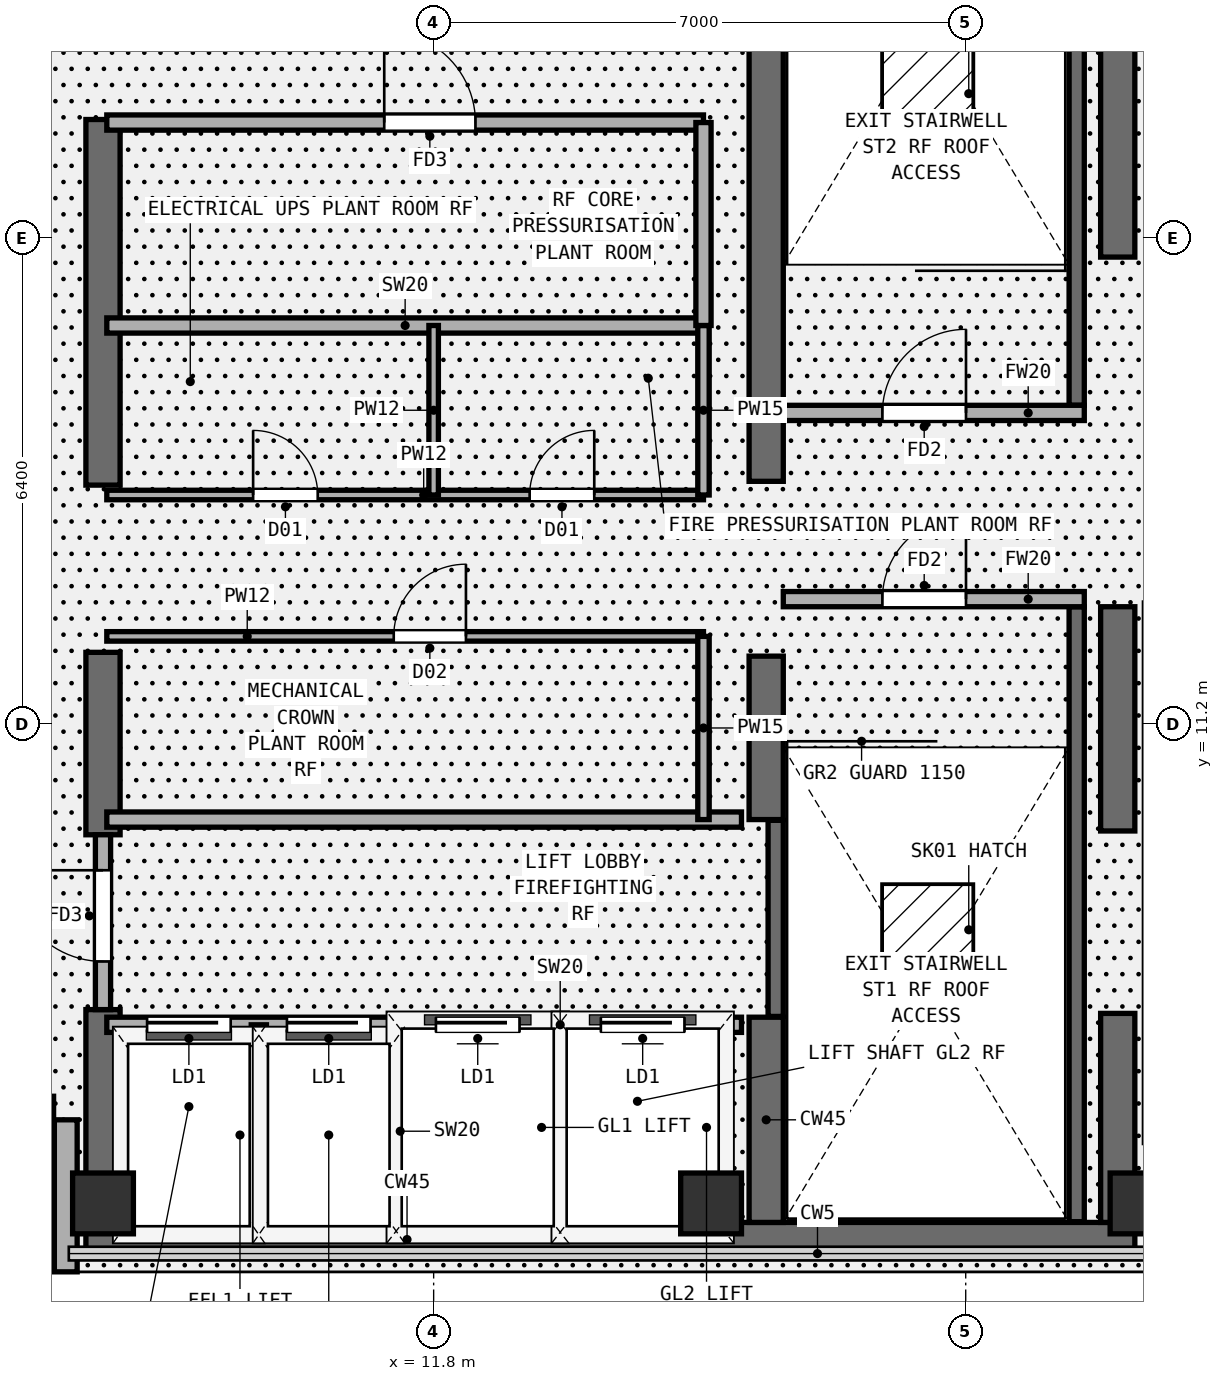
"""IFC4 building model, lengths in metres.
Left out: names, types, materials, properties, quantities, classifications, styles, units other than length and angle.
Written with IfcOpenShell. Run it as: python <this file> out.ifc"""

import sys

from ifc_helpers import new_model, si_unit, direction, frame, frame_2d, origin, origin_2d, place, context, subcontext, project, spatial, rectangle, extrude, element, fill, save


model = new_model("IFC4")
c1 = context("Model", 3, precision=1e-05, world=origin(), true_north=direction((0.0, 1.0)))
c2 = subcontext(c1, "Body", "Model", "MODEL_VIEW")
j1 = project(units=[si_unit("LENGTHUNIT", "METRE"), si_unit("PLANEANGLEUNIT", "RADIAN")], contexts=[c1])
p1 = place(None, origin())
s1 = spatial("IfcSite", under=j1, at=p1, CompositionType="ELEMENT")
p2 = place(p1, origin())
s2 = spatial("IfcBuilding", under=s1, at=p2, CompositionType="ELEMENT")
p3 = place(p2, frame((0.0, 0.0, 360.4)))
s3 = spatial("IfcBuildingStorey", under=s2, at=p3, CompositionType="ELEMENT", Elevation=360.4)
p4 = place(p3, frame((7.225, 4.425, 0.0), z_axis=(0.0, 0.0, 1.0), x_axis=(1.0, 0.0, 0.0)))
e1 = element("IfcWall", 1, at=p4, inside=s3, PredefinedType="SHEAR", context=c2, shape_type="SweptSolid", body=[
    extrude(rectangle(XDim=13.8, YDim=0.45, at=frame_2d((6.9, 0.0))), origin(), (0.0, 0.0, 1.0), 4.659),
])
p5 = place(p3, frame((7.45, 4.65, 0.0), z_axis=(0.0, 0.0, 1.0), x_axis=(0.0, 1.0, 0.0)))
e2 = element("IfcWall", 2, at=p5, inside=s3, PredefinedType="SHEAR", context=c2, shape_type="SweptSolid", body=[
    extrude(rectangle(XDim=2.8, YDim=0.45, at=frame_2d((1.4, 0.0))), origin(), (0.0, 0.0, 1.0), 4.531),
])
p6 = place(p3, frame((7.45, 9.75, 0.0), z_axis=(0.0, 0.0, 1.0), x_axis=(0.0, 1.0, 0.0)))
e3 = element("IfcWall", 3, at=p6, inside=s3, PredefinedType="SHEAR", context=c2, shape_type="SweptSolid", body=[
    extrude(rectangle(XDim=2.4, YDim=0.45, at=frame_2d((1.2, 0.0))), origin(), (0.0, 0.0, 1.0), 4.531),
])
p7 = place(p3, frame((7.45, 14.35, 0.0), z_axis=(0.0, 0.0, 1.0), x_axis=(0.0, 1.0, 0.0)))
e4 = element("IfcWall", 4, at=p7, inside=s3, PredefinedType="SHEAR", context=c2, shape_type="SweptSolid", body=[
    extrude(rectangle(XDim=4.81, YDim=0.45, at=frame_2d((2.405, 0.0))), origin(), (0.0, 0.0, 1.0), 4.531),
])
p8 = place(p3, frame((20.8, 4.65, 0.0), z_axis=(0.0, 0.0, 1.0), x_axis=(0.0, 1.0, 0.0)))
e5 = element("IfcWall", 5, at=p8, inside=s3, PredefinedType="SHEAR", context=c2, shape_type="SweptSolid", body=[
    extrude(rectangle(XDim=2.75, YDim=0.45, at=frame_2d((1.375, 0.0))), origin(), (0.0, 0.0, 1.0), 4.787),
])
p9 = place(p3, frame((20.8, 9.8, 0.0), z_axis=(0.0, 0.0, 1.0), x_axis=(0.0, 1.0, 0.0)))
e6 = element("IfcWall", 6, at=p9, inside=s3, PredefinedType="SHEAR", context=c2, shape_type="SweptSolid", body=[
    extrude(rectangle(XDim=2.95, YDim=0.45, at=frame_2d((1.475, 0.0))), origin(), (0.0, 0.0, 1.0), 4.787),
])
p10 = place(p3, frame((20.8, 17.35, 0.0), z_axis=(0.0, 0.0, 1.0), x_axis=(0.0, 1.0, 0.0)))
e7 = element("IfcWall", 7, at=p10, inside=s3, PredefinedType="SHEAR", context=c2, shape_type="SweptSolid", body=[
    extrude(rectangle(XDim=6.15, YDim=0.45, at=frame_2d((3.075, 0.0))), origin(), (0.0, 0.0, 1.0), 4.787),
])
p11 = place(p3, frame((16.175, 4.65, 0.0), z_axis=(0.0, 0.0, 1.0), x_axis=(0.0, 1.0, 0.0)))
e8 = element("IfcWall", 8, at=p11, inside=s3, PredefinedType="SHEAR", context=c2, shape_type="SweptSolid", body=[
    extrude(rectangle(XDim=2.7, YDim=0.45, at=frame_2d((1.35, 0.0))), origin(), (0.0, 0.0, 1.0), 4.698),
])
p12 = place(p3, frame((16.175, 9.95, 0.0), z_axis=(0.0, 0.0, 1.0), x_axis=(0.0, 1.0, 0.0)))
e9 = element("IfcWall", 9, at=p12, inside=s3, PredefinedType="SHEAR", context=c2, shape_type="SweptSolid", body=[
    extrude(rectangle(XDim=2.15, YDim=0.45, at=frame_2d((1.075, 0.0))), origin(), (0.0, 0.0, 1.0), 4.698),
])
p13 = place(p3, frame((16.175, 14.4, 0.0), z_axis=(0.0, 0.0, 1.0), x_axis=(0.0, 1.0, 0.0)))
e10 = element("IfcWall", 10, at=p13, inside=s3, PredefinedType="SHEAR", context=c2, shape_type="SweptSolid", body=[
    extrude(rectangle(XDim=9.1, YDim=0.45, at=frame_2d((4.55, 0.0))), origin(), (0.0, 0.0, 1.0), 4.698),
])
p14 = place(p3, frame((7.45, 4.9, 0.0), z_axis=(0.0, 0.0, 1.0), x_axis=(1.0, 0.0, 0.0)))
e11 = element("IfcColumn", 11, at=p14, inside=s3, PredefinedType="COLUMN", context=c2, shape_type="SweptSolid", body=[
    extrude(rectangle(XDim=0.8, YDim=0.8, at=origin_2d()), origin(), (0.0, 0.0, 1.0), 4.531),
])
p15 = place(p3, frame((15.45, 4.9, 0.0), z_axis=(0.0, 0.0, 1.0), x_axis=(1.0, 0.0, 0.0)))
e12 = element("IfcColumn", 12, at=p15, inside=s3, PredefinedType="COLUMN", context=c2, shape_type="SweptSolid", body=[
    extrude(rectangle(XDim=0.8, YDim=0.8, at=origin_2d()), origin(), (0.0, 0.0, 1.0), 4.684),
])
p16 = place(p3, frame((21.1, 4.9, 0.0), z_axis=(0.0, 0.0, 1.0), x_axis=(1.0, 0.0, 0.0)))
e13 = element("IfcColumn", 13, at=p16, inside=s3, PredefinedType="COLUMN", context=c2, shape_type="SweptSolid", body=[
    extrude(rectangle(XDim=0.8, YDim=0.8, at=origin_2d()), origin(), (0.0, 0.0, 1.0), 4.793),
])
p17 = place(p3, frame((27.487, 19.087, 0.0), z_axis=(0.0, 0.0, 1.0), x_axis=(-0.707106781187, 0.707106781187, 0.0)))
e14 = element("IfcWall", 14, at=p17, inside=s3, PredefinedType="PARAPET", context=c2, shape_type="SweptSolid", body=[
    extrude(rectangle(XDim=9.051, YDim=0.3, at=frame_2d((4.525, 0.0))), origin(), (0.0, 0.0, 1.0), 4.805),
])
p18 = place(p3, frame((4.8, 6.16, 0.0), z_axis=(0.0, 0.0, 1.0), x_axis=(1.0, 0.0, 0.0)))
e15 = element("IfcWall", 15, at=p18, inside=s3, PredefinedType="PARAPET", context=c2, shape_type="SweptSolid", body=[
    extrude(rectangle(XDim=2.0, YDim=0.3, at=frame_2d((1.0, 0.0))), origin(), (0.0, 0.0, 1.0), 4.49),
])
p19 = place(p3, frame((6.96, 6.0, 0.0), z_axis=(0.0, 0.0, 1.0), x_axis=(0.0, -1.0, 0.0)))
e16 = element("IfcWall", 16, at=p19, inside=s3, PredefinedType="PARAPET", context=c2, shape_type="SweptSolid", body=[
    extrude(rectangle(XDim=2.0, YDim=0.3, at=frame_2d((1.0, 0.0))), origin(), (0.0, 0.0, 1.0), 4.529),
])
p20 = place(p3, frame((16.3, 7.36, 0.0), z_axis=(0.0, 0.0, 1.0), x_axis=(0.0, 1.0, 0.0)))
e17 = element("IfcWall", 17, at=p20, inside=s3, PredefinedType="SHEAR", context=c2, shape_type="SweptSolid", body=[
    extrude(rectangle(XDim=2.58, YDim=0.2, at=frame_2d((1.29, 0.0))), origin(), (0.0, 0.0, 1.0), 4.48),
])
p21 = place(p3, frame((20.26, 4.66, 0.0), z_axis=(0.0, 0.0, 1.0), x_axis=(0.0, 1.0, 0.0)))
e18 = element("IfcWall", 18, at=p21, inside=s3, PredefinedType="SHEAR", context=c2, shape_type="SweptSolid", body=[
    extrude(rectangle(XDim=8.09, YDim=0.2, at=frame_2d((4.045, 0.0))), origin(), (0.0, 0.0, 1.0), 4.48),
])
p22 = place(p3, frame((16.4, 12.85, 0.0), z_axis=(0.0, 0.0, 1.0), x_axis=(1.0, 0.0, 0.0)))
e19 = element("IfcWall", 19, at=p22, inside=s3, PredefinedType="PARTITIONING", context=c2, shape_type="SweptSolid", body=[
    extrude(rectangle(XDim=3.96, YDim=0.2, at=frame_2d((1.98, 0.0))), origin(), (0.0, 0.0, 1.0), 4.48),
])
p23 = place(p22, frame((1.304, 0.0, 0.0)))
e20 = element("IfcOpeningElement", 20, at=p23, cuts=e19, PredefinedType="OPENING", context=c2, shape_type="SweptSolid", body=[
    extrude(rectangle(XDim=1.1, YDim=2.2, at=frame_2d((0.55, 1.1))), frame((0.0, 0.11, 0.0), z_axis=(0.0, -1.0, 0.0), x_axis=(1.0, 0.0, 0.0)), (0.0, 0.0, 1.0), 0.22),
])
p24 = place(p3, frame((20.26, 15.4, 0.0), z_axis=(0.0, 0.0, 1.0), x_axis=(0.0, 1.0, 0.0)))
e21 = element("IfcWall", 21, at=p24, inside=s3, PredefinedType="SHEAR", context=c2, shape_type="SweptSolid", body=[
    extrude(rectangle(XDim=8.09, YDim=0.2, at=frame_2d((4.045, 0.0))), origin(), (0.0, 0.0, 1.0), 4.48),
])
p25 = place(p3, frame((16.41, 15.3, 0.0), z_axis=(0.0, 0.0, 1.0), x_axis=(1.0, 0.0, 0.0)))
e22 = element("IfcWall", 22, at=p25, inside=s3, PredefinedType="PARTITIONING", context=c2, shape_type="SweptSolid", body=[
    extrude(rectangle(XDim=3.95, YDim=0.2, at=frame_2d((1.975, 0.0))), origin(), (0.0, 0.0, 1.0), 4.48),
])
p26 = place(p25, frame((1.294, 0.0, 0.0)))
e23 = element("IfcOpeningElement", 23, at=p26, cuts=e22, PredefinedType="OPENING", context=c2, shape_type="SweptSolid", body=[
    extrude(rectangle(XDim=1.1, YDim=2.2, at=frame_2d((0.55, 1.1))), frame((0.0, 0.11, 0.0), z_axis=(0.0, -1.0, 0.0), x_axis=(1.0, 0.0, 0.0)), (0.0, 0.0, 1.0), 0.22),
])
p27 = place(p3, frame((7.5, 7.25, 0.0), z_axis=(0.0, 0.0, 1.0), x_axis=(1.0, 0.0, 0.0)))
e24 = element("IfcWall", 24, at=p27, inside=s3, PredefinedType="PARTITIONING", context=c2, shape_type="SweptSolid", body=[
    extrude(rectangle(XDim=8.35, YDim=0.2, at=frame_2d((4.175, 0.0))), origin(), (0.0, 0.0, 1.0), 4.48),
])
p28 = place(p27, frame((0.53, 0.0, 0.0)))
e25 = element("IfcOpeningElement", 25, at=p28, cuts=e24, PredefinedType="OPENING", context=c2, shape_type="SweptSolid", body=[
    extrude(rectangle(XDim=1.1, YDim=2.2, at=frame_2d((0.55, 1.1))), frame((0.0, 0.11, 0.0), z_axis=(0.0, -1.0, 0.0), x_axis=(1.0, 0.0, 0.0)), (0.0, 0.0, 1.0), 0.22),
])
p29 = place(p27, frame((2.37, 0.0, 0.0)))
e26 = element("IfcOpeningElement", 26, at=p29, cuts=e24, PredefinedType="OPENING", context=c2, shape_type="SweptSolid", body=[
    extrude(rectangle(XDim=1.1, YDim=2.2, at=frame_2d((0.55, 1.1))), frame((0.0, 0.11, 0.0), z_axis=(0.0, -1.0, 0.0), x_axis=(1.0, 0.0, 0.0)), (0.0, 0.0, 1.0), 0.22),
])
p30 = place(p27, frame((4.33, 0.0, 0.0)))
e27 = element("IfcOpeningElement", 27, at=p30, cuts=e24, PredefinedType="OPENING", context=c2, shape_type="SweptSolid", body=[
    extrude(rectangle(XDim=1.1, YDim=2.2, at=frame_2d((0.55, 1.1))), frame((0.0, 0.11, 0.0), z_axis=(0.0, -1.0, 0.0), x_axis=(1.0, 0.0, 0.0)), (0.0, 0.0, 1.0), 0.22),
])
p31 = place(p27, frame((6.5, 0.0, 0.0)))
e28 = element("IfcOpeningElement", 28, at=p31, cuts=e24, PredefinedType="OPENING", context=c2, shape_type="SweptSolid", body=[
    extrude(rectangle(XDim=1.1, YDim=2.2, at=frame_2d((0.55, 1.1))), frame((0.0, 0.11, 0.0), z_axis=(0.0, -1.0, 0.0), x_axis=(1.0, 0.0, 0.0)), (0.0, 0.0, 1.0), 0.22),
])
p32 = place(p3, frame((7.5, 9.95, 0.0), z_axis=(0.0, 0.0, 1.0), x_axis=(1.0, 0.0, 0.0)))
e29 = element("IfcWall", 29, at=p32, inside=s3, PredefinedType="PARTITIONING", context=c2, shape_type="SweptSolid", body=[
    extrude(rectangle(XDim=8.35, YDim=0.2, at=frame_2d((4.175, 0.0))), origin(), (0.0, 0.0, 1.0), 4.48),
])
for number, where, z_axis, x_axis in (
    (30, (9.5, 4.45, 0.0), (0.0, 0.0, 1.0), (0.0, 1.0, 0.0)),
    (31, (11.36, 4.45, 0.0), (0.0, 0.0, 1.0), (0.0, 1.0, 0.0)),
    (32, (13.46, 4.45, 0.0), (0.0, 0.0, 1.0), (0.0, 1.0, 0.0)),
):
    element("IfcWall", number, at=place(p3, frame(where, z_axis=z_axis, x_axis=x_axis)), inside=s3, PredefinedType="PARTITIONING", context=c2, shape_type="SweptSolid", body=[
        extrude(rectangle(XDim=2.8, YDim=0.2, at=frame_2d((1.4, 0.0))), origin(), (0.0, 0.0, 1.0), 4.48),
    ])
p33 = place(p3, frame((7.45, 7.45, 0.0), z_axis=(0.0, 0.0, 1.0), x_axis=(0.0, 1.0, 0.0)))
e33 = element("IfcWall", 33, at=p33, inside=s3, PredefinedType="PARTITIONING", context=c2, shape_type="SweptSolid", body=[
    extrude(rectangle(XDim=2.3, YDim=0.2, at=frame_2d((1.15, 0.0))), origin(), (0.0, 0.0, 1.0), 3.46),
])
p34 = place(p33, frame((0.633, 0.0, 0.0)))
e34 = element("IfcOpeningElement", 34, at=p34, cuts=e33, PredefinedType="OPENING", context=c2, shape_type="SweptSolid", body=[
    extrude(rectangle(XDim=1.2, YDim=2.25, at=frame_2d((0.6, 1.125))), frame((0.0, 0.11, 0.0), z_axis=(0.0, -1.0, 0.0), x_axis=(1.0, 0.0, 0.0)), (0.0, 0.0, 1.0), 0.22),
])
p35 = place(p3, frame((7.5, 16.45, 0.0), z_axis=(0.0, 0.0, 1.0), x_axis=(1.0, 0.0, 0.0)))
e35 = element("IfcWall", 35, at=p35, inside=s3, PredefinedType="PARTITIONING", context=c2, shape_type="SweptSolid", body=[
    extrude(rectangle(XDim=7.85, YDim=0.2, at=frame_2d((3.925, 0.0))), origin(), (0.0, 0.0, 1.0), 4.48),
])
p36 = place(p3, frame((7.5, 12.36, 0.0), z_axis=(0.0, 0.0, 1.0), x_axis=(1.0, 0.0, 0.0)))
e36 = element("IfcWall", 36, at=p36, inside=s3, PredefinedType="PARTITIONING", context=c2, shape_type="SweptSolid", body=[
    extrude(rectangle(XDim=7.85, YDim=0.125, at=frame_2d((3.925, 0.0))), origin(), (0.0, 0.0, 1.0), 4.48),
])
p37 = place(p36, frame((3.775, 0.0, 0.0)))
e37 = element("IfcOpeningElement", 37, at=p37, cuts=e36, PredefinedType="OPENING", context=c2, shape_type="SweptSolid", body=[
    extrude(rectangle(XDim=0.95, YDim=2.15, at=frame_2d((0.475, 1.075))), frame((0.0, 0.073, 0.0), z_axis=(0.0, -1.0, 0.0), x_axis=(1.0, 0.0, 0.0)), (0.0, 0.0, 1.0), 0.145),
])
p38 = place(p3, frame((7.5, 14.22, 0.0), z_axis=(0.0, 0.0, 1.0), x_axis=(1.0, 0.0, 0.0)))
e38 = element("IfcWall", 38, at=p38, inside=s3, PredefinedType="PARTITIONING", context=c2, shape_type="SweptSolid", body=[
    extrude(rectangle(XDim=7.85, YDim=0.125, at=frame_2d((3.925, 0.0))), origin(), (0.0, 0.0, 1.0), 4.48),
])
p39 = place(p38, frame((1.925, 0.0, 0.0)))
e39 = element("IfcOpeningElement", 39, at=p39, cuts=e38, PredefinedType="OPENING", context=c2, shape_type="SweptSolid", body=[
    extrude(rectangle(XDim=0.85, YDim=2.15, at=frame_2d((0.425, 1.075))), frame((0.0, 0.073, 0.0), z_axis=(0.0, -1.0, 0.0), x_axis=(1.0, 0.0, 0.0)), (0.0, 0.0, 1.0), 0.145),
])
p40 = place(p38, frame((5.563, 0.0, 0.0)))
e40 = element("IfcOpeningElement", 40, at=p40, cuts=e38, PredefinedType="OPENING", context=c2, shape_type="SweptSolid", body=[
    extrude(rectangle(XDim=0.85, YDim=2.15, at=frame_2d((0.425, 1.075))), frame((0.0, 0.073, 0.0), z_axis=(0.0, -1.0, 0.0), x_axis=(1.0, 0.0, 0.0)), (0.0, 0.0, 1.0), 0.145),
])
p41 = place(p3, frame((15.35, 9.95, 0.0), z_axis=(0.0, 0.0, 1.0), x_axis=(0.0, 1.0, 0.0)))
e41 = element("IfcWall", 41, at=p41, inside=s3, PredefinedType="PARTITIONING", context=c2, shape_type="SweptSolid", body=[
    extrude(rectangle(XDim=2.41, YDim=0.15, at=frame_2d((1.205, 0.0))), origin(), (0.0, 0.0, 1.0), 4.48),
])
p42 = place(p3, frame((15.35, 14.22, 0.0), z_axis=(0.0, 0.0, 1.0), x_axis=(0.0, 1.0, 0.0)))
e42 = element("IfcWall", 42, at=p42, inside=s3, PredefinedType="PARTITIONING", context=c2, shape_type="SweptSolid", body=[
    extrude(rectangle(XDim=2.23, YDim=0.15, at=frame_2d((1.115, 0.0))), origin(), (0.0, 0.0, 1.0), 4.48),
])
p43 = place(p3, frame((11.8, 14.22, 0.0), z_axis=(0.0, 0.0, 1.0), x_axis=(0.0, 1.0, 0.0)))
e43 = element("IfcWall", 43, at=p43, inside=s3, PredefinedType="PARTITIONING", context=c2, shape_type="SweptSolid", body=[
    extrude(rectangle(XDim=2.23, YDim=0.125, at=frame_2d((1.115, 0.0))), origin(), (0.0, 0.0, 1.0), 4.48),
])
p44 = place(p3, frame((7.5, 19.12, 0.0), z_axis=(0.0, 0.0, 1.0), x_axis=(1.0, 0.0, 0.0)))
e44 = element("IfcWall", 44, at=p44, inside=s3, PredefinedType="PARTITIONING", context=c2, shape_type="SweptSolid", body=[
    extrude(rectangle(XDim=7.85, YDim=0.2, at=frame_2d((3.925, 0.0))), origin(), (0.0, 0.0, 1.0), 4.48),
])
p45 = place(p44, frame((3.65, 0.0, 0.0)))
e45 = element("IfcOpeningElement", 45, at=p45, cuts=e44, PredefinedType="OPENING", context=c2, shape_type="SweptSolid", body=[
    extrude(rectangle(XDim=1.2, YDim=2.25, at=frame_2d((0.6, 1.125))), frame((0.0, 0.11, 0.0), z_axis=(0.0, -1.0, 0.0), x_axis=(1.0, 0.0, 0.0)), (0.0, 0.0, 1.0), 0.22),
])
p46 = place(p3, frame((15.35, 16.45, 0.0), z_axis=(0.0, 0.0, 1.0), x_axis=(0.0, 1.0, 0.0)))
e46 = element("IfcWall", 46, at=p46, inside=s3, PredefinedType="PARTITIONING", context=c2, shape_type="SweptSolid", body=[
    extrude(rectangle(XDim=2.67, YDim=0.2, at=frame_2d((1.335, 0.0))), origin(), (0.0, 0.0, 1.0), 4.48),
])
p47 = place(p3, frame((6.8, 4.0, 4.799), z_axis=(-0.019179722964, -9.68549e-07, 0.999816052195), x_axis=(0.999816052195, -8e-12, 0.019179722964)))
p48 = place(p47, frame((11.502, 4.5, 0.0)))
p49 = place(p48, frame((0.0, 0.0, -0.05)))
e47 = element("IfcWindow", 47, at=p49, inside=s3, PartitioningType="SINGLE_PANEL", PredefinedType="SKYLIGHT", context=c2, shape_type="SweptSolid", body=[
    extrude(rectangle(XDim=1.2, YDim=1.2, at=origin_2d()), origin(), (0.0, 0.0, 1.0), 0.05),
])
p50 = place(p47, frame((11.502, 15.5, 0.0)))
p51 = place(p50, frame((0.0, 0.0, -0.05)))
e48 = element("IfcWindow", 48, at=p51, inside=s3, PartitioningType="SINGLE_PANEL", PredefinedType="SKYLIGHT", context=c2, shape_type="SweptSolid", body=[
    extrude(rectangle(XDim=1.2, YDim=1.2, at=origin_2d()), origin(), (0.0, 0.0, 1.0), 0.05),
])
p52 = place(p23, frame((1.1, 0.0, 0.0), z_axis=(0.0, 0.0, 1.0), x_axis=(-1.0, 0.0, 0.0)))
e49 = element("IfcDoor", 49, at=p52, inside=s3, OperationType="SINGLE_SWING_LEFT", PredefinedType="DOOR", context=c2, shape_type="SweptSolid", body=[
    extrude(rectangle(XDim=1.1, YDim=2.2, at=frame_2d((0.55, 1.1))), frame((0.0, 0.025, 0.0), z_axis=(0.0, -1.0, 0.0), x_axis=(1.0, 0.0, 0.0)), (0.0, 0.0, 1.0), 0.05),
])
fill(e20, e49)
p53 = place(p26, origin())
e50 = element("IfcDoor", 50, at=p53, inside=s3, OperationType="SINGLE_SWING_RIGHT", PredefinedType="DOOR", context=c2, shape_type="SweptSolid", body=[
    extrude(rectangle(XDim=1.1, YDim=2.2, at=frame_2d((0.55, 1.1))), frame((0.0, 0.025, 0.0), z_axis=(0.0, -1.0, 0.0), x_axis=(1.0, 0.0, 0.0)), (0.0, 0.0, 1.0), 0.05),
])
fill(e23, e50)
p54 = place(p28, origin())
e51 = element("IfcDoor", 51, at=p54, inside=s3, OperationType="SLIDING_TO_LEFT", PredefinedType="DOOR", context=c2, shape_type="SweptSolid", body=[
    extrude(rectangle(XDim=1.1, YDim=2.2, at=frame_2d((0.55, 1.1))), frame((0.0, 0.025, 0.0), z_axis=(0.0, -1.0, 0.0), x_axis=(1.0, 0.0, 0.0)), (0.0, 0.0, 1.0), 0.05),
])
fill(e25, e51)
p55 = place(p29, origin())
e52 = element("IfcDoor", 52, at=p55, inside=s3, OperationType="SLIDING_TO_LEFT", PredefinedType="DOOR", context=c2, shape_type="SweptSolid", body=[
    extrude(rectangle(XDim=1.1, YDim=2.2, at=frame_2d((0.55, 1.1))), frame((0.0, 0.025, 0.0), z_axis=(0.0, -1.0, 0.0), x_axis=(1.0, 0.0, 0.0)), (0.0, 0.0, 1.0), 0.05),
])
fill(e26, e52)
p56 = place(p30, origin())
e53 = element("IfcDoor", 53, at=p56, inside=s3, OperationType="SLIDING_TO_LEFT", PredefinedType="DOOR", context=c2, shape_type="SweptSolid", body=[
    extrude(rectangle(XDim=1.1, YDim=2.2, at=frame_2d((0.55, 1.1))), frame((0.0, 0.025, 0.0), z_axis=(0.0, -1.0, 0.0), x_axis=(1.0, 0.0, 0.0)), (0.0, 0.0, 1.0), 0.05),
])
fill(e27, e53)
p57 = place(p31, origin())
e54 = element("IfcDoor", 54, at=p57, inside=s3, OperationType="SLIDING_TO_LEFT", PredefinedType="DOOR", context=c2, shape_type="SweptSolid", body=[
    extrude(rectangle(XDim=1.1, YDim=2.2, at=frame_2d((0.55, 1.1))), frame((0.0, 0.025, 0.0), z_axis=(0.0, -1.0, 0.0), x_axis=(1.0, 0.0, 0.0)), (0.0, 0.0, 1.0), 0.05),
])
fill(e28, e54)
p58 = place(p34, frame((1.2, 0.0, 0.0), z_axis=(0.0, 0.0, 1.0), x_axis=(-1.0, 0.0, 0.0)))
e55 = element("IfcDoor", 55, at=p58, inside=s3, OperationType="SINGLE_SWING_LEFT", PredefinedType="DOOR", context=c2, shape_type="SweptSolid", body=[
    extrude(rectangle(XDim=1.2, YDim=2.25, at=frame_2d((0.6, 1.125))), frame((0.0, 0.025, 0.0), z_axis=(0.0, -1.0, 0.0), x_axis=(1.0, 0.0, 0.0)), (0.0, 0.0, 1.0), 0.05),
])
fill(e34, e55)
p59 = place(p37, origin())
e56 = element("IfcDoor", 56, at=p59, inside=s3, OperationType="SINGLE_SWING_RIGHT", PredefinedType="DOOR", context=c2, shape_type="SweptSolid", body=[
    extrude(rectangle(XDim=0.95, YDim=2.15, at=frame_2d((0.475, 1.075))), frame((0.0, 0.025, 0.0), z_axis=(0.0, -1.0, 0.0), x_axis=(1.0, 0.0, 0.0)), (0.0, 0.0, 1.0), 0.05),
])
fill(e37, e56)
p60 = place(p39, origin())
e57 = element("IfcDoor", 57, at=p60, inside=s3, OperationType="SINGLE_SWING_LEFT", PredefinedType="DOOR", context=c2, shape_type="SweptSolid", body=[
    extrude(rectangle(XDim=0.85, YDim=2.15, at=frame_2d((0.425, 1.075))), frame((0.0, 0.025, 0.0), z_axis=(0.0, -1.0, 0.0), x_axis=(1.0, 0.0, 0.0)), (0.0, 0.0, 1.0), 0.05),
])
fill(e39, e57)
p61 = place(p40, origin())
e58 = element("IfcDoor", 58, at=p61, inside=s3, OperationType="SINGLE_SWING_RIGHT", PredefinedType="DOOR", context=c2, shape_type="SweptSolid", body=[
    extrude(rectangle(XDim=0.85, YDim=2.15, at=frame_2d((0.425, 1.075))), frame((0.0, 0.025, 0.0), z_axis=(0.0, -1.0, 0.0), x_axis=(1.0, 0.0, 0.0)), (0.0, 0.0, 1.0), 0.05),
])
fill(e40, e58)
p62 = place(p45, origin())
e59 = element("IfcDoor", 59, at=p62, inside=s3, OperationType="SINGLE_SWING_LEFT", PredefinedType="DOOR", context=c2, shape_type="SweptSolid", body=[
    extrude(rectangle(XDim=1.2, YDim=2.25, at=frame_2d((0.6, 1.125))), frame((0.0, 0.025, 0.0), z_axis=(0.0, -1.0, 0.0), x_axis=(1.0, 0.0, 0.0)), (0.0, 0.0, 1.0), 0.05),
])
fill(e45, e59)
save(model, sys.argv[1])
